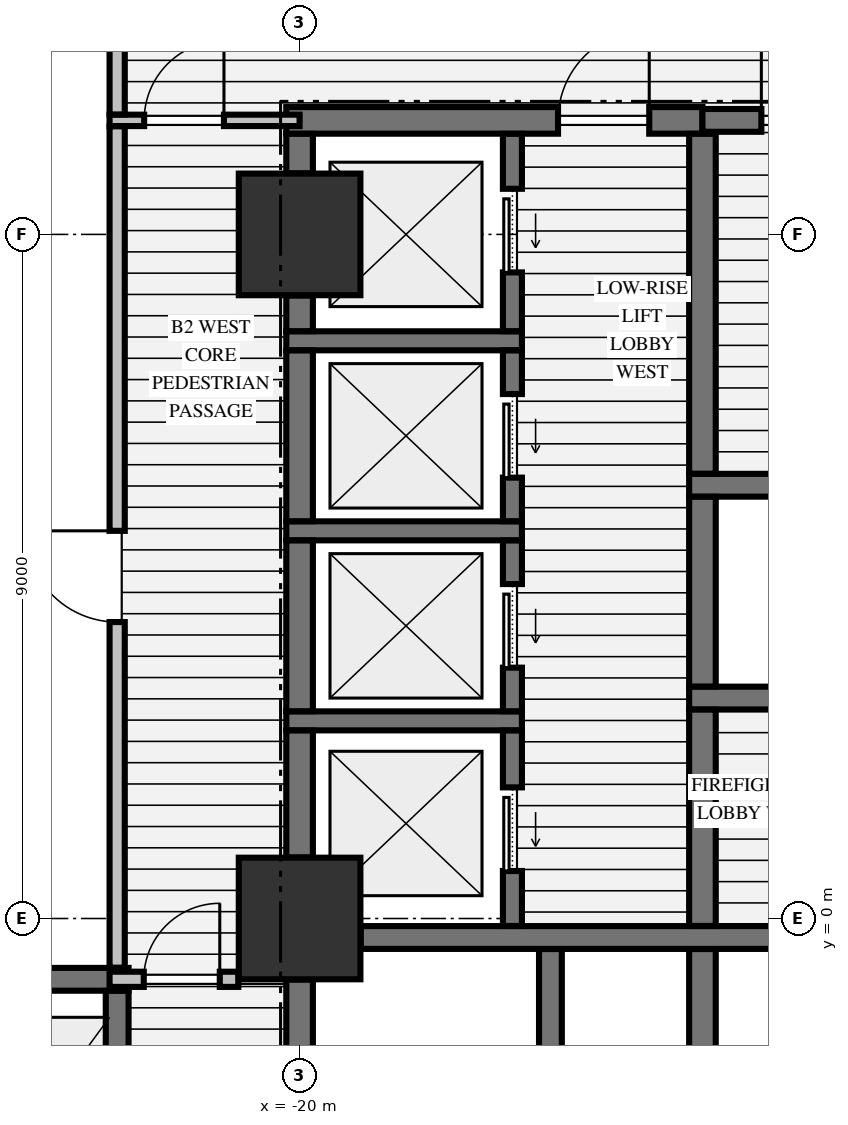
"""IFC4 building model, lengths in metres.
Left out: names, types, materials, properties, quantities, classifications, styles, units other than length and angle.
Written with IfcOpenShell. Run it as: python <this file> out.ifc"""

import sys

from ifc_helpers import new_model, si_unit, direction, frame, frame_2d, origin, origin_2d, place, context, subcontext, project, spatial, rectangle, extrude, element, fill, save


model = new_model("IFC4")
c1 = context("Model", 3, precision=1e-05, world=origin(), true_north=direction((0.0, 1.0)))
c2 = subcontext(c1, "Body", "Model", "MODEL_VIEW")
j1 = project(units=[si_unit("LENGTHUNIT", "METRE"), si_unit("PLANEANGLEUNIT", "RADIAN")], contexts=[c1])
p1 = place(None, origin())
s1 = spatial("IfcSite", under=j1, at=p1, CompositionType="ELEMENT")
p2 = place(p1, origin())
s2 = spatial("IfcBuilding", under=s1, at=p2, CompositionType="ELEMENT")
p3 = place(p2, frame((0.0, 0.0, -9.1)))
s3 = spatial("IfcBuildingStorey", under=s2, at=p3, CompositionType="ELEMENT", Elevation=-9.1)
for number, where, z_axis, x_axis in (
    (1, (-20.0, 0.0, -0.45), (0.0, 0.0, 1.0), (1.0, 0.0, 0.0)),
    (2, (-20.0, 9.0, -0.45), (0.0, 0.0, 1.0), (1.0, 0.0, 0.0)),
):
    element("IfcColumn", number, at=place(p3, frame(where, z_axis=z_axis, x_axis=x_axis)), inside=s3, PredefinedType="COLUMN", context=c2, shape_type="SweptSolid", body=[
        extrude(rectangle(XDim=1.6, YDim=1.6, at=origin_2d()), origin(), (0.0, 0.0, 1.0), 4.65),
    ])
p4 = place(p3, frame((-25.296, -0.8, 0.0), z_axis=(0.0, 0.0, 1.0), x_axis=(1.0, 0.0, 0.0)))
e3 = element("IfcWall", 3, at=p4, inside=s3, PredefinedType="SHEAR", context=c2, shape_type="SweptSolid", body=[
    extrude(rectangle(XDim=3.046, YDim=0.3, at=frame_2d((1.523, 0.0))), origin(), (0.0, 0.0, 1.0), 4.2),
])
p5 = place(p3, frame((-19.196, -0.25, 0.0), z_axis=(0.0, 0.0, 1.0), x_axis=(1.0, 0.0, 0.0)))
e4 = element("IfcWall", 4, at=p5, inside=s3, PredefinedType="SHEAR", context=c2, shape_type="SweptSolid", body=[
    extrude(rectangle(XDim=7.392, YDim=0.3, at=frame_2d((3.696, 0.0))), origin(), (0.0, 0.0, 1.0), 4.2),
])
p6 = place(p5, frame((5.496, 0.0, 0.0)))
e5 = element("IfcOpeningElement", 5, at=p6, cuts=e4, PredefinedType="OPENING", context=c2, shape_type="SweptSolid", body=[
    extrude(rectangle(XDim=1.1, YDim=2.15, at=frame_2d((0.55, 1.075))), frame((0.0, 0.16, 0.0), z_axis=(0.0, -1.0, 0.0), x_axis=(1.0, 0.0, 0.0)), (0.0, 0.0, 1.0), 0.32),
])
p7 = place(p3, frame((-20.175, 2.6, 0.0), z_axis=(0.0, 0.0, 1.0), x_axis=(1.0, 0.0, 0.0)))
e6 = element("IfcWall", 6, at=p7, inside=s3, PredefinedType="SOLIDWALL", context=c2, shape_type="SweptSolid", body=[
    extrude(rectangle(XDim=3.1, YDim=0.25, at=frame_2d((1.55, 0.0))), origin(), (0.0, 0.0, 1.0), 4.2),
])
p8 = place(p3, frame((-14.875, 2.9, 0.0), z_axis=(0.0, 0.0, 1.0), x_axis=(1.0, 0.0, 0.0)))
e7 = element("IfcWall", 7, at=p8, inside=s3, PredefinedType="SHEAR", context=c2, shape_type="SweptSolid", body=[
    extrude(rectangle(XDim=4.025, YDim=0.3, at=frame_2d((2.012, 0.0))), origin(), (0.0, 0.0, 1.0), 4.2),
])
p9 = place(p8, frame((2.075, 0.0, 0.0)))
e8 = element("IfcOpeningElement", 8, at=p9, cuts=e7, PredefinedType="OPENING", context=c2, shape_type="SweptSolid", body=[
    extrude(rectangle(XDim=1.1, YDim=2.2, at=frame_2d((0.55, 1.1))), frame((0.0, 0.16, 0.0), z_axis=(0.0, -1.0, 0.0), x_axis=(1.0, 0.0, 0.0)), (0.0, 0.0, 1.0), 0.32),
])
p10 = place(p3, frame((-20.175, 5.1, 0.0), z_axis=(0.0, 0.0, 1.0), x_axis=(1.0, 0.0, 0.0)))
e9 = element("IfcWall", 9, at=p10, inside=s3, PredefinedType="SOLIDWALL", context=c2, shape_type="SweptSolid", body=[
    extrude(rectangle(XDim=3.1, YDim=0.25, at=frame_2d((1.55, 0.0))), origin(), (0.0, 0.0, 1.0), 4.2),
])
p11 = place(p3, frame((-14.875, 5.7, 0.0), z_axis=(0.0, 0.0, 1.0), x_axis=(1.0, 0.0, 0.0)))
e10 = element("IfcWall", 10, at=p11, inside=s3, PredefinedType="SHEAR", context=c2, shape_type="SweptSolid", body=[
    extrude(rectangle(XDim=4.025, YDim=0.3, at=frame_2d((2.012, 0.0))), origin(), (0.0, 0.0, 1.0), 4.2),
])
p12 = place(p3, frame((-20.175, 7.6, 0.0), z_axis=(0.0, 0.0, 1.0), x_axis=(1.0, 0.0, 0.0)))
e11 = element("IfcWall", 11, at=p12, inside=s3, PredefinedType="SOLIDWALL", context=c2, shape_type="SweptSolid", body=[
    extrude(rectangle(XDim=3.1, YDim=0.25, at=frame_2d((1.55, 0.0))), origin(), (0.0, 0.0, 1.0), 4.2),
])
p13 = place(p3, frame((-20.175, 10.5, 0.0), z_axis=(0.0, 0.0, 1.0), x_axis=(1.0, 0.0, 0.0)))
e12 = element("IfcWall", 12, at=p13, inside=s3, PredefinedType="SHEAR", context=c2, shape_type="SweptSolid", body=[
    extrude(rectangle(XDim=5.475, YDim=0.35, at=frame_2d((2.738, 0.0))), origin(), (0.0, 0.0, 1.0), 4.2),
])
p14 = place(p13, frame((3.575, 0.0, 0.0)))
e13 = element("IfcOpeningElement", 13, at=p14, cuts=e12, PredefinedType="OPENING", context=c2, shape_type="SweptSolid", body=[
    extrude(rectangle(XDim=1.2, YDim=2.15, at=frame_2d((0.6, 1.075))), frame((0.0, 0.185, 0.0), z_axis=(0.0, -1.0, 0.0), x_axis=(1.0, 0.0, 0.0)), (0.0, 0.0, 1.0), 0.37),
])
p15 = place(p3, frame((-14.7, 10.5, 0.0), z_axis=(0.0, 0.0, 1.0), x_axis=(1.0, 0.0, 0.0)))
e14 = element("IfcWall", 14, at=p15, inside=s3, PredefinedType="SHEAR", context=c2, shape_type="SweptSolid", body=[
    extrude(rectangle(XDim=3.85, YDim=0.3, at=frame_2d((1.925, 0.0))), origin(), (0.0, 0.0, 1.0), 4.2),
])
p16 = place(p15, frame((0.775, 0.0, 0.0)))
e15 = element("IfcOpeningElement", 15, at=p16, cuts=e14, PredefinedType="OPENING", context=c2, shape_type="SweptSolid", body=[
    extrude(rectangle(XDim=0.95, YDim=2.15, at=frame_2d((0.475, 1.075))), frame((0.0, 0.16, 0.0), z_axis=(0.0, -1.0, 0.0), x_axis=(1.0, 0.0, 0.0)), (0.0, 0.0, 1.0), 0.32),
])
p17 = place(p3, frame((-22.5, -0.8, 0.0), z_axis=(0.0, 0.0, 1.0), x_axis=(1.0, 0.0, 0.0)))
e16 = element("IfcWall", 16, at=p17, inside=s3, PredefinedType="PARTITIONING", context=c2, shape_type="SweptSolid", body=[
    extrude(rectangle(XDim=1.694, YDim=0.2, at=frame_2d((0.847, 0.0))), origin(), (0.0, 0.0, 1.0), 4.2),
])
p18 = place(p17, frame((0.45, 0.0, 0.0)))
e17 = element("IfcOpeningElement", 17, at=p18, cuts=e16, PredefinedType="OPENING", context=c2, shape_type="SweptSolid", body=[
    extrude(rectangle(XDim=1.0, YDim=2.15, at=frame_2d((0.5, 1.075))), frame((0.0, 0.11, 0.0), z_axis=(0.0, -1.0, 0.0), x_axis=(1.0, 0.0, 0.0)), (0.0, 0.0, 1.0), 0.22),
])
p19 = place(p3, frame((-22.5, 10.5, 0.0), z_axis=(0.0, 0.0, 1.0), x_axis=(1.0, 0.0, 0.0)))
e18 = element("IfcWall", 18, at=p19, inside=s3, PredefinedType="PARTITIONING", context=c2, shape_type="SweptSolid", body=[
    extrude(rectangle(XDim=2.5, YDim=0.15, at=frame_2d((1.25, 0.0))), origin(), (0.0, 0.0, 1.0), 4.2),
])
p20 = place(p19, frame((0.455, 0.0, 0.0)))
e19 = element("IfcOpeningElement", 19, at=p20, cuts=e18, PredefinedType="OPENING", context=c2, shape_type="SweptSolid", body=[
    extrude(rectangle(XDim=1.05, YDim=2.15, at=frame_2d((0.525, 1.075))), frame((0.0, 0.085, 0.0), z_axis=(0.0, -1.0, 0.0), x_axis=(1.0, 0.0, 0.0)), (0.0, 0.0, 1.0), 0.17),
])
p21 = place(p3, frame((-22.4, -4.648, 0.0), z_axis=(0.0, 0.0, 1.0), x_axis=(0.0, 1.0, 0.0)))
e20 = element("IfcWall", 20, at=p21, inside=s3, PredefinedType="SHEAR", context=c2, shape_type="SweptSolid", body=[
    extrude(rectangle(XDim=3.696, YDim=0.3, at=frame_2d((1.848, 0.0))), origin(), (0.0, 0.0, 1.0), 4.2),
])
p22 = place(p21, frame((1.198, 0.0, 0.0)))
e21 = element("IfcOpeningElement", 21, at=p22, cuts=e20, PredefinedType="OPENING", context=c2, shape_type="SweptSolid", body=[
    extrude(rectangle(XDim=1.3, YDim=2.3, at=frame_2d((0.65, 1.15))), frame((0.0, 0.16, 0.0), z_axis=(0.0, -1.0, 0.0), x_axis=(1.0, 0.0, 0.0)), (0.0, 0.0, 1.0), 0.32),
])
p23 = place(p3, frame((-20.0, -8.196, 0.0), z_axis=(0.0, 0.0, 1.0), x_axis=(0.0, 1.0, 0.0)))
e22 = element("IfcWall", 22, at=p23, inside=s3, PredefinedType="SHEAR", context=c2, shape_type="SweptSolid", body=[
    extrude(rectangle(XDim=7.392, YDim=0.35, at=frame_2d((3.696, 0.0))), origin(), (0.0, 0.0, 1.0), 4.2),
])
p24 = place(p3, frame((-20.0, 0.804, 0.0), z_axis=(0.0, 0.0, 1.0), x_axis=(0.0, 1.0, 0.0)))
e23 = element("IfcWall", 23, at=p24, inside=s3, PredefinedType="SHEAR", context=c2, shape_type="SweptSolid", body=[
    extrude(rectangle(XDim=1.669, YDim=0.35, at=frame_2d((0.834, 0.0))), origin(), (0.0, 0.0, 1.0), 4.2),
])
for number, where, z_axis, x_axis in (
    (24, (-20.0, 2.727, 0.0), (0.0, 0.0, 1.0), (0.0, 1.0, 0.0)),
    (25, (-20.0, 5.227, 0.0), (0.0, 0.0, 1.0), (0.0, 1.0, 0.0)),
):
    element("IfcWall", number, at=place(p3, frame(where, z_axis=z_axis, x_axis=x_axis)), inside=s3, PredefinedType="SHEAR", context=c2, shape_type="SweptSolid", body=[
        extrude(rectangle(XDim=2.246, YDim=0.35, at=frame_2d((1.123, 0.0))), origin(), (0.0, 0.0, 1.0), 4.2),
    ])
p25 = place(p3, frame((-20.0, 7.727, 0.0), z_axis=(0.0, 0.0, 1.0), x_axis=(0.0, 1.0, 0.0)))
e26 = element("IfcWall", 26, at=p25, inside=s3, PredefinedType="SHEAR", context=c2, shape_type="SweptSolid", body=[
    extrude(rectangle(XDim=0.469, YDim=0.35, at=frame_2d((0.234, 0.0))), origin(), (0.0, 0.0, 1.0), 4.2),
])
p26 = place(p3, frame((-20.0, 9.804, 0.0), z_axis=(0.0, 0.0, 1.0), x_axis=(0.0, 1.0, 0.0)))
e27 = element("IfcWall", 27, at=p26, inside=s3, PredefinedType="SHEAR", context=c2, shape_type="SweptSolid", body=[
    extrude(rectangle(XDim=0.519, YDim=0.35, at=frame_2d((0.26, 0.0))), origin(), (0.0, 0.0, 1.0), 4.2),
])
p27 = place(p3, frame((-17.2, -0.098, 0.0), z_axis=(0.0, 0.0, 1.0), x_axis=(0.0, 1.0, 0.0)))
e28 = element("IfcWall", 28, at=p27, inside=s3, PredefinedType="SOLIDWALL", context=c2, shape_type="SweptSolid", body=[
    extrude(rectangle(XDim=2.571, YDim=0.25, at=frame_2d((1.285, 0.0))), origin(), (0.0, 0.0, 1.0), 4.2),
])
p28 = place(p27, frame((0.723, 0.0, 0.0)))
e29 = element("IfcOpeningElement", 29, at=p28, cuts=e28, PredefinedType="OPENING", context=c2, shape_type="SweptSolid", body=[
    extrude(rectangle(XDim=1.1, YDim=2.2, at=frame_2d((0.55, 1.1))), frame((0.0, 0.135, 0.0), z_axis=(0.0, -1.0, 0.0), x_axis=(1.0, 0.0, 0.0)), (0.0, 0.0, 1.0), 0.27),
])
p29 = place(p3, frame((-17.2, 2.727, 0.0), z_axis=(0.0, 0.0, 1.0), x_axis=(0.0, 1.0, 0.0)))
e30 = element("IfcWall", 30, at=p29, inside=s3, PredefinedType="SOLIDWALL", context=c2, shape_type="SweptSolid", body=[
    extrude(rectangle(XDim=2.246, YDim=0.25, at=frame_2d((1.123, 0.0))), origin(), (0.0, 0.0, 1.0), 4.2),
])
p30 = place(p29, frame((0.573, 0.0, 0.0)))
e31 = element("IfcOpeningElement", 31, at=p30, cuts=e30, PredefinedType="OPENING", context=c2, shape_type="SweptSolid", body=[
    extrude(rectangle(XDim=1.1, YDim=2.2, at=frame_2d((0.55, 1.1))), frame((0.0, 0.135, 0.0), z_axis=(0.0, -1.0, 0.0), x_axis=(1.0, 0.0, 0.0)), (0.0, 0.0, 1.0), 0.27),
])
p31 = place(p3, frame((-17.2, 5.227, 0.0), z_axis=(0.0, 0.0, 1.0), x_axis=(0.0, 1.0, 0.0)))
e32 = element("IfcWall", 32, at=p31, inside=s3, PredefinedType="SOLIDWALL", context=c2, shape_type="SweptSolid", body=[
    extrude(rectangle(XDim=2.246, YDim=0.25, at=frame_2d((1.123, 0.0))), origin(), (0.0, 0.0, 1.0), 4.2),
])
p32 = place(p31, frame((0.573, 0.0, 0.0)))
e33 = element("IfcOpeningElement", 33, at=p32, cuts=e32, PredefinedType="OPENING", context=c2, shape_type="SweptSolid", body=[
    extrude(rectangle(XDim=1.1, YDim=2.2, at=frame_2d((0.55, 1.1))), frame((0.0, 0.135, 0.0), z_axis=(0.0, -1.0, 0.0), x_axis=(1.0, 0.0, 0.0)), (0.0, 0.0, 1.0), 0.27),
])
p33 = place(p3, frame((-17.2, 7.727, 0.0), z_axis=(0.0, 0.0, 1.0), x_axis=(0.0, 1.0, 0.0)))
e34 = element("IfcWall", 34, at=p33, inside=s3, PredefinedType="SOLIDWALL", context=c2, shape_type="SweptSolid", body=[
    extrude(rectangle(XDim=2.596, YDim=0.25, at=frame_2d((1.298, 0.0))), origin(), (0.0, 0.0, 1.0), 4.2),
])
p34 = place(p33, frame((0.773, 0.0, 0.0)))
e35 = element("IfcOpeningElement", 35, at=p34, cuts=e34, PredefinedType="OPENING", context=c2, shape_type="SweptSolid", body=[
    extrude(rectangle(XDim=1.1, YDim=2.2, at=frame_2d((0.55, 1.1))), frame((0.0, 0.135, 0.0), z_axis=(0.0, -1.0, 0.0), x_axis=(1.0, 0.0, 0.0)), (0.0, 0.0, 1.0), 0.27),
])
p35 = place(p3, frame((-16.7, -9.773, 0.0), z_axis=(0.0, 0.0, 1.0), x_axis=(0.0, 1.0, 0.0)))
e36 = element("IfcWall", 36, at=p35, inside=s3, PredefinedType="SHEAR", context=c2, shape_type="SweptSolid", body=[
    extrude(rectangle(XDim=9.371, YDim=0.3, at=frame_2d((4.686, 0.0))), origin(), (0.0, 0.0, 1.0), 4.2),
])
p36 = place(p3, frame((-14.7, -9.773, 0.0), z_axis=(0.0, 0.0, 1.0), x_axis=(0.0, 1.0, 0.0)))
e37 = element("IfcWall", 37, at=p36, inside=s3, PredefinedType="SHEAR", context=c2, shape_type="SweptSolid", body=[
    extrude(rectangle(XDim=9.371, YDim=0.35, at=frame_2d((4.686, 0.0))), origin(), (0.0, 0.0, 1.0), 4.2),
])
p37 = place(p3, frame((-14.7, -0.098, 0.0), z_axis=(0.0, 0.0, 1.0), x_axis=(0.0, 1.0, 0.0)))
e38 = element("IfcWall", 38, at=p37, inside=s3, PredefinedType="SHEAR", context=c2, shape_type="SweptSolid", body=[
    extrude(rectangle(XDim=2.846, YDim=0.35, at=frame_2d((1.423, 0.0))), origin(), (0.0, 0.0, 1.0), 4.2),
])
p38 = place(p3, frame((-14.7, 3.052, 0.0), z_axis=(0.0, 0.0, 1.0), x_axis=(0.0, 1.0, 0.0)))
e39 = element("IfcWall", 39, at=p38, inside=s3, PredefinedType="SHEAR", context=c2, shape_type="SweptSolid", body=[
    extrude(rectangle(XDim=2.496, YDim=0.35, at=frame_2d((1.248, 0.0))), origin(), (0.0, 0.0, 1.0), 4.2),
])
p39 = place(p3, frame((-14.7, 5.852, 0.0), z_axis=(0.0, 0.0, 1.0), x_axis=(0.0, 1.0, 0.0)))
e40 = element("IfcWall", 40, at=p39, inside=s3, PredefinedType="SHEAR", context=c2, shape_type="SweptSolid", body=[
    extrude(rectangle(XDim=4.471, YDim=0.35, at=frame_2d((2.235, 0.0))), origin(), (0.0, 0.0, 1.0), 4.2),
])
p40 = place(p3, frame((-22.4, -0.647, 0.0), z_axis=(0.0, 0.0, 1.0), x_axis=(0.0, 1.0, 0.0)))
e41 = element("IfcWall", 41, at=p40, inside=s3, PredefinedType="PARTITIONING", context=c2, shape_type="SweptSolid", body=[
    extrude(rectangle(XDim=11.069, YDim=0.2, at=frame_2d((5.535, 0.0))), origin(), (0.0, 0.0, 1.0), 4.2),
])
p41 = place(p40, frame((4.547, 0.0, 0.0)))
e42 = element("IfcOpeningElement", 42, at=p41, cuts=e41, PredefinedType="OPENING", context=c2, shape_type="SweptSolid", body=[
    extrude(rectangle(XDim=1.2, YDim=2.15, at=frame_2d((0.6, 1.075))), frame((0.0, 0.11, 0.0), z_axis=(0.0, -1.0, 0.0), x_axis=(1.0, 0.0, 0.0)), (0.0, 0.0, 1.0), 0.22),
])
p42 = place(p3, frame((-22.4, 10.578, 0.0), z_axis=(0.0, 0.0, 1.0), x_axis=(0.0, 1.0, 0.0)))
e43 = element("IfcWall", 43, at=p42, inside=s3, PredefinedType="PARTITIONING", context=c2, shape_type="SweptSolid", body=[
    extrude(rectangle(XDim=2.544, YDim=0.2, at=frame_2d((1.272, 0.0))), origin(), (0.0, 0.0, 1.0), 4.2),
])
p43 = place(p16, origin())
e44 = element("IfcDoor", 44, at=p43, inside=s3, OperationType="SINGLE_SWING_LEFT", PredefinedType="DOOR", context=c2, shape_type="SweptSolid", body=[
    extrude(rectangle(XDim=0.95, YDim=2.15, at=frame_2d((0.475, 1.075))), frame((0.0, 0.025, 0.0), z_axis=(0.0, -1.0, 0.0), x_axis=(1.0, 0.0, 0.0)), (0.0, 0.0, 1.0), 0.05),
])
fill(e15, e44)
p44 = place(p14, origin())
e45 = element("IfcDoor", 45, at=p44, inside=s3, OperationType="SINGLE_SWING_RIGHT", PredefinedType="DOOR", context=c2, shape_type="SweptSolid", body=[
    extrude(rectangle(XDim=1.2, YDim=2.15, at=frame_2d((0.6, 1.075))), frame((0.0, 0.025, 0.0), z_axis=(0.0, -1.0, 0.0), x_axis=(1.0, 0.0, 0.0)), (0.0, 0.0, 1.0), 0.05),
])
fill(e13, e45)
p45 = place(p28, origin())
e46 = element("IfcDoor", 46, at=p45, inside=s3, OperationType="SLIDING_TO_LEFT", PredefinedType="DOOR", context=c2, shape_type="SweptSolid", body=[
    extrude(rectangle(XDim=1.1, YDim=2.2, at=frame_2d((0.55, 1.1))), frame((0.0, 0.025, 0.0), z_axis=(0.0, -1.0, 0.0), x_axis=(1.0, 0.0, 0.0)), (0.0, 0.0, 1.0), 0.05),
])
fill(e29, e46)
p46 = place(p30, origin())
e47 = element("IfcDoor", 47, at=p46, inside=s3, OperationType="SLIDING_TO_LEFT", PredefinedType="DOOR", context=c2, shape_type="SweptSolid", body=[
    extrude(rectangle(XDim=1.1, YDim=2.2, at=frame_2d((0.55, 1.1))), frame((0.0, 0.025, 0.0), z_axis=(0.0, -1.0, 0.0), x_axis=(1.0, 0.0, 0.0)), (0.0, 0.0, 1.0), 0.05),
])
fill(e31, e47)
p47 = place(p32, origin())
e48 = element("IfcDoor", 48, at=p47, inside=s3, OperationType="SLIDING_TO_LEFT", PredefinedType="DOOR", context=c2, shape_type="SweptSolid", body=[
    extrude(rectangle(XDim=1.1, YDim=2.2, at=frame_2d((0.55, 1.1))), frame((0.0, 0.025, 0.0), z_axis=(0.0, -1.0, 0.0), x_axis=(1.0, 0.0, 0.0)), (0.0, 0.0, 1.0), 0.05),
])
fill(e33, e48)
p48 = place(p34, origin())
e49 = element("IfcDoor", 49, at=p48, inside=s3, OperationType="SLIDING_TO_LEFT", PredefinedType="DOOR", context=c2, shape_type="SweptSolid", body=[
    extrude(rectangle(XDim=1.1, YDim=2.2, at=frame_2d((0.55, 1.1))), frame((0.0, 0.025, 0.0), z_axis=(0.0, -1.0, 0.0), x_axis=(1.0, 0.0, 0.0)), (0.0, 0.0, 1.0), 0.05),
])
fill(e35, e49)
p49 = place(p18, origin())
e50 = element("IfcDoor", 50, at=p49, inside=s3, OperationType="SINGLE_SWING_RIGHT", PredefinedType="DOOR", context=c2, shape_type="SweptSolid", body=[
    extrude(rectangle(XDim=1.0, YDim=2.15, at=frame_2d((0.5, 1.075))), frame((0.0, 0.025, 0.0), z_axis=(0.0, -1.0, 0.0), x_axis=(1.0, 0.0, 0.0)), (0.0, 0.0, 1.0), 0.05),
])
fill(e17, e50)
p50 = place(p20, origin())
e51 = element("IfcDoor", 51, at=p50, inside=s3, OperationType="SINGLE_SWING_RIGHT", PredefinedType="DOOR", context=c2, shape_type="SweptSolid", body=[
    extrude(rectangle(XDim=1.05, YDim=2.15, at=frame_2d((0.525, 1.075))), frame((0.0, 0.025, 0.0), z_axis=(0.0, -1.0, 0.0), x_axis=(1.0, 0.0, 0.0)), (0.0, 0.0, 1.0), 0.05),
])
fill(e19, e51)
p51 = place(p41, origin())
e52 = element("IfcDoor", 52, at=p51, inside=s3, OperationType="SINGLE_SWING_RIGHT", PredefinedType="DOOR", context=c2, shape_type="SweptSolid", body=[
    extrude(rectangle(XDim=1.2, YDim=2.15, at=frame_2d((0.6, 1.075))), frame((0.0, 0.025, 0.0), z_axis=(0.0, -1.0, 0.0), x_axis=(1.0, 0.0, 0.0)), (0.0, 0.0, 1.0), 0.05),
])
fill(e42, e52)
save(model, sys.argv[1])
